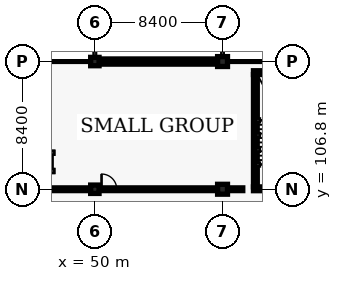
"""IFC4 building model, lengths in metres.
Left out: names, types, materials, properties, quantities, classifications, styles, units other than length and angle.
Written with IfcOpenShell. Run it as: python <this file> out.ifc"""

import sys

from ifc_helpers import new_model, si_unit, direction, frame, frame_2d, origin, origin_2d, place, context, subcontext, project, spatial, rectangle, extrude, element, fill, save


model = new_model("IFC4")
c1 = context("Model", 3, precision=1e-05, world=origin(), true_north=direction((0.0, 1.0)))
c2 = subcontext(c1, "Body", "Model", "MODEL_VIEW")
j1 = project(units=[si_unit("LENGTHUNIT", "METRE"), si_unit("PLANEANGLEUNIT", "RADIAN")], contexts=[c1])
p1 = place(None, origin())
s1 = spatial("IfcSite", under=j1, at=p1, CompositionType="ELEMENT")
p2 = place(p1, origin())
s2 = spatial("IfcBuilding", under=s1, at=p2, CompositionType="ELEMENT")
p3 = place(p2, frame((0.0, 0.0, 9.0)))
s3 = spatial("IfcBuildingStorey", under=s2, at=p3, CompositionType="ELEMENT", Elevation=9.0)
for number, where, z_axis, x_axis in (
    (1, (50.0, 106.8, 0.0), (0.0, 0.0, 1.0), (1.0, 0.0, 0.0)),
    (2, (50.0, 115.2, 0.0), (0.0, 0.0, 1.0), (1.0, 0.0, 0.0)),
):
    element("IfcColumn", number, at=place(p3, frame(where, z_axis=z_axis, x_axis=x_axis)), inside=s3, PredefinedType="COLUMN", context=c2, shape_type="SweptSolid", body=[
        extrude(rectangle(XDim=0.55, YDim=0.55, at=origin_2d()), origin(), (0.0, 0.0, 1.0), 3.9),
    ])
for number, where, z_axis, x_axis in (
    (3, (58.4, 106.8, 0.0), (0.0, 0.0, 1.0), (1.0, 0.0, 0.0)),
    (4, (58.4, 115.2, 0.0), (0.0, 0.0, 1.0), (1.0, 0.0, 0.0)),
):
    element("IfcColumn", number, at=place(p3, frame(where, z_axis=z_axis, x_axis=x_axis)), inside=s3, PredefinedType="COLUMN", context=c2, shape_type="SweptSolid", body=[
        extrude(rectangle(XDim=0.65, YDim=0.65, at=origin_2d()), origin(), (0.0, 0.0, 1.0), 3.9),
    ])
p4 = place(p3, frame((50.1, 115.2, 0.0), z_axis=(0.0, 0.0, 1.0), x_axis=(1.0, 0.0, 0.0)))
e5 = element("IfcWall", 5, at=p4, inside=s3, PredefinedType="SOLIDWALL", context=c2, shape_type="SweptSolid", body=[
    extrude(rectangle(XDim=8.2, YDim=0.34, at=frame_2d((4.1, 0.0))), origin(), (0.0, 0.0, 1.0), 2.845),
])
p5 = place(p3, frame((64.045, 106.83, 0.0), z_axis=(0.0, 0.0, 1.0), x_axis=(-1.0, 0.0, 0.0)))
e6 = element("IfcWall", 6, at=p5, inside=s3, PredefinedType="SHEAR", context=c2, shape_type="SweptSolid", body=[
    extrude(rectangle(XDim=3.61, YDim=0.25, at=frame_2d((1.805, 0.0))), origin(), (0.0, 0.0, 1.0), 3.66),
])
p6 = place(p5, frame((1.205, 0.0, 0.0)))
e7 = element("IfcOpeningElement", 7, at=p6, cuts=e6, PredefinedType="OPENING", context=c2, shape_type="SweptSolid", body=[
    extrude(rectangle(XDim=1.2, YDim=2.15, at=frame_2d((0.6, 1.075))), frame((0.0, 0.135, 0.0), z_axis=(0.0, -1.0, 0.0), x_axis=(1.0, 0.0, 0.0)), (0.0, 0.0, 1.0), 0.27),
])
p7 = place(p3, frame((60.435, 114.47, 0.0), z_axis=(0.0, 0.0, 1.0), x_axis=(1.0, 0.0, 0.0)))
e8 = element("IfcWall", 8, at=p7, inside=s3, PredefinedType="SHEAR", context=c2, shape_type="SweptSolid", body=[
    extrude(rectangle(XDim=3.61, YDim=0.25, at=frame_2d((1.805, 0.0))), origin(), (0.0, 0.0, 1.0), 3.66),
])
p8 = place(p3, frame((60.56, 106.955, 0.0), z_axis=(0.0, 0.0, 1.0), x_axis=(0.0, 1.0, 0.0)))
e9 = element("IfcWall", 9, at=p8, inside=s3, PredefinedType="SHEAR", context=c2, shape_type="SweptSolid", body=[
    extrude(rectangle(XDim=7.39, YDim=0.25, at=frame_2d((3.695, 0.0))), origin(), (0.0, 0.0, 1.0), 3.66),
])
p9 = place(p3, frame((42.15, 106.8, 0.0), z_axis=(0.0, 0.0, 1.0), x_axis=(1.0, 0.0, 0.0)))
e10 = element("IfcWall", 10, at=p9, inside=s3, PredefinedType="PARTITIONING", context=c2, shape_type="SweptSolid", body=[
    extrude(rectangle(XDim=17.58, YDim=0.18, at=frame_2d((8.79, 0.0))), origin(), (0.0, 0.0, 1.0), 2.845),
])
p10 = place(p9, frame((8.29, 0.0, 0.0)))
e11 = element("IfcOpeningElement", 11, at=p10, cuts=e10, PredefinedType="OPENING", context=c2, shape_type="SweptSolid", body=[
    extrude(rectangle(XDim=1.0, YDim=2.14, at=frame_2d((0.5, 1.07))), frame((0.0, 0.1, 0.0), z_axis=(0.0, -1.0, 0.0), x_axis=(1.0, 0.0, 0.0)), (0.0, 0.0, 1.0), 0.2),
])
p11 = place(p10, origin())
e12 = element("IfcDoor", 12, at=p11, inside=s3, OperationType="SINGLE_SWING_LEFT", PredefinedType="DOOR", context=c2, shape_type="SweptSolid", body=[
    extrude(rectangle(XDim=1.0, YDim=2.14, at=frame_2d((0.5, 1.07))), frame((0.0, 0.025, 0.0), z_axis=(0.0, -1.0, 0.0), x_axis=(1.0, 0.0, 0.0)), (0.0, 0.0, 1.0), 0.05),
])
fill(e11, e12)
save(model, sys.argv[1])
